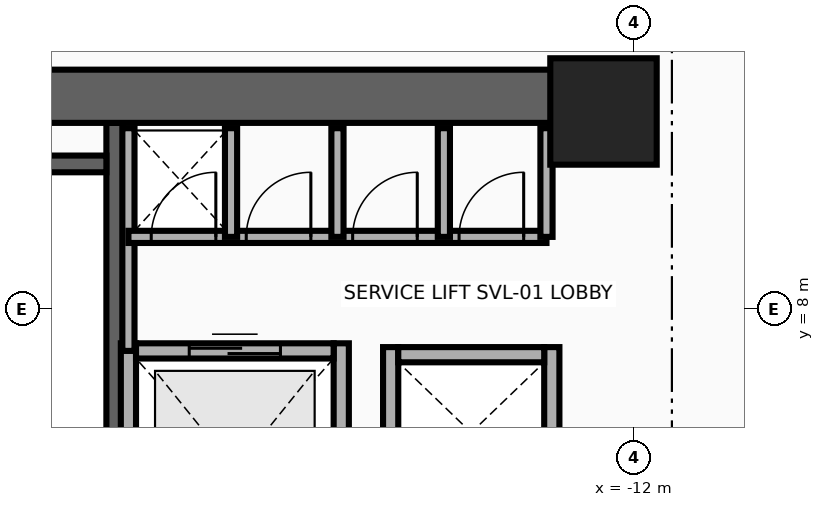
"""IFC4 building model, lengths in metres.
Left out: names, types, materials, properties, quantities, classifications, styles, units other than length and angle.
Written with IfcOpenShell. Run it as: python <this file> out.ifc"""

import sys

from ifc_helpers import new_model, si_unit, direction, frame, frame_2d, origin, origin_2d, place, context, subcontext, project, spatial, rectangle, extrude, source, transform, mapped, element, fill, save


model = new_model("IFC4")
c1 = context("Model", 3, precision=1e-05, world=origin(), true_north=direction((0.0, 1.0)))
c2 = subcontext(c1, "Body", "Model", "MODEL_VIEW")
j1 = project(units=[si_unit("LENGTHUNIT", "METRE"), si_unit("PLANEANGLEUNIT", "RADIAN")], contexts=[c1])
p1 = place(None, origin())
s1 = spatial("IfcSite", under=j1, at=p1, CompositionType="ELEMENT")
p2 = place(p1, origin())
s2 = spatial("IfcBuilding", under=s1, at=p2, CompositionType="ELEMENT")
p3 = place(p2, frame((0.0, 0.0, 48.2)))
s3 = spatial("IfcBuildingStorey", under=s2, at=p3, CompositionType="ELEMENT", Elevation=48.2)
p4 = place(p3, frame((-18.83, 1.78, 0.0), z_axis=(0.0, 0.0, 1.0), x_axis=(0.0, 1.0, 0.0)))
e1 = element("IfcWall", 1, at=p4, inside=s3, PredefinedType="SHEAR", context=c2, shape_type="SweptSolid", body=[
    extrude(rectangle(XDim=8.67, YDim=0.22, at=frame_2d((4.335, 0.0))), origin(), (0.0, 0.0, 1.0), 3.46),
])
p5 = place(p3, frame((-22.05, 9.91, 0.0), z_axis=(0.0, 0.0, 1.0), x_axis=(1.0, 0.0, 0.0)))
e2 = element("IfcWall", 2, at=p5, inside=s3, PredefinedType="SHEAR", context=c2, shape_type="SweptSolid", body=[
    extrude(rectangle(XDim=3.11, YDim=0.22, at=frame_2d((1.555, 0.0))), origin(), (0.0, 0.0, 1.0), 3.46),
])
p6 = place(p3, frame((-22.65, 10.8, 0.0), z_axis=(0.0, 0.0, 1.0), x_axis=(1.0, 0.0, 0.0)))
e3 = element("IfcWall", 3, at=p6, inside=s3, PredefinedType="SHEAR", context=c2, shape_type="SweptSolid", body=[
    extrude(rectangle(XDim=10.25, YDim=0.7, at=frame_2d((5.125, 0.0))), origin(), (0.0, 0.0, 1.0), 3.46),
])
m1 = source(origin(), c2, "Body", "SweptSolid", [
    extrude(rectangle(XDim=1.4, YDim=1.4, at=origin_2d()), origin(), (0.0, 0.0, 1.0), 3.7),
])
p7 = place(p3, frame((-12.4, 10.6, 0.0), z_axis=(0.0, 0.0, 1.0), x_axis=(1.0, 0.0, 0.0)))
e4 = element("IfcColumn", 4, at=p7, inside=s3, PredefinedType="COLUMN", context=c2, shape_type="MappedRepresentation", body=[
    mapped(m1, transform((0.0, 0.0, 0.0), x_axis=(1.0, 0.0, 0.0), y_axis=(0.0, 1.0, 0.0), z_axis=(0.0, 0.0, 1.0), scale=1.0)),
])
for number, where, z_axis, x_axis in (
    (5, (-18.65, 4.225, 0.0), (0.0, 0.0, 1.0), (0.0, 1.0, 0.0)),
    (6, (-15.85, 4.225, 0.0), (0.0, 0.0, 1.0), (0.0, 1.0, 0.0)),
):
    element("IfcWall", number, at=place(p3, frame(where, z_axis=z_axis, x_axis=x_axis)), inside=s3, PredefinedType="MOVABLE", context=c2, shape_type="SweptSolid", body=[
        extrude(rectangle(XDim=3.325, YDim=0.2, at=frame_2d((1.663, 0.0))), origin(), (0.0, 0.0, 1.0), 3.46),
    ])
p8 = place(p3, frame((-18.55, 7.45, 0.0), z_axis=(0.0, 0.0, 1.0), x_axis=(1.0, 0.0, 0.0)))
e7 = element("IfcWall", 7, at=p8, inside=s3, PredefinedType="MOVABLE", context=c2, shape_type="SweptSolid", body=[
    extrude(rectangle(XDim=2.6, YDim=0.2, at=frame_2d((1.3, 0.0))), origin(), (0.0, 0.0, 1.0), 3.46),
])
p9 = place(p8, frame((0.7, 0.0, 0.0)))
e8 = element("IfcOpeningElement", 8, at=p9, cuts=e7, PredefinedType="OPENING", context=c2, shape_type="SweptSolid", body=[
    extrude(rectangle(XDim=1.2, YDim=2.1, at=frame_2d((0.6, 1.05))), frame((0.0, 0.115, 0.0), z_axis=(0.0, -1.0, 0.0), x_axis=(1.0, 0.0, 0.0)), (0.0, 0.0, 1.0), 0.23),
])
for number, where, z_axis, x_axis in (
    (9, (-15.2, 5.25, 0.0), (0.0, 0.0, 1.0), (0.0, 1.0, 0.0)),
    (10, (-13.08, 5.25, 0.0), (0.0, 0.0, 1.0), (0.0, 1.0, 0.0)),
):
    element("IfcWall", number, at=place(p3, frame(where, z_axis=z_axis, x_axis=x_axis)), inside=s3, PredefinedType="MOVABLE", context=c2, shape_type="SweptSolid", body=[
        extrude(rectangle(XDim=2.25, YDim=0.2, at=frame_2d((1.125, 0.0))), origin(), (0.0, 0.0, 1.0), 3.46),
    ])
p10 = place(p3, frame((-15.1, 7.4, 0.0), z_axis=(0.0, 0.0, 1.0), x_axis=(1.0, 0.0, 0.0)))
e11 = element("IfcWall", 11, at=p10, inside=s3, PredefinedType="MOVABLE", context=c2, shape_type="SweptSolid", body=[
    extrude(rectangle(XDim=1.92, YDim=0.2, at=frame_2d((0.96, 0.0))), origin(), (0.0, 0.0, 1.0), 3.46),
])
p11 = place(p3, frame((-18.65, 7.45, 0.0), z_axis=(0.0, 0.0, 1.0), x_axis=(0.0, 1.0, 0.0)))
e12 = element("IfcWall", 12, at=p11, inside=s3, PredefinedType="PARTITIONING", context=c2, shape_type="SweptSolid", body=[
    extrude(rectangle(XDim=2.93, YDim=0.16, at=frame_2d((1.465, 0.0))), origin(), (0.0, 0.0, 1.0), 3.46),
])
p12 = place(p3, frame((-18.65, 8.95, 0.0), z_axis=(0.0, 0.0, 1.0), x_axis=(1.0, 0.0, 0.0)))
e13 = element("IfcWall", 13, at=p12, inside=s3, PredefinedType="PARTITIONING", context=c2, shape_type="SweptSolid", body=[
    extrude(rectangle(XDim=5.5, YDim=0.16, at=frame_2d((2.75, 0.0))), origin(), (0.0, 0.0, 1.0), 3.46),
])
p13 = place(p12, frame((0.3, 0.0, 0.0)))
e14 = element("IfcOpeningElement", 14, at=p13, cuts=e13, PredefinedType="OPENING", context=c2, shape_type="SweptSolid", body=[
    extrude(rectangle(XDim=0.85, YDim=2.05, at=frame_2d((0.425, 1.025))), frame((0.0, 0.095, 0.0), z_axis=(0.0, -1.0, 0.0), x_axis=(1.0, 0.0, 0.0)), (0.0, 0.0, 1.0), 0.19),
])
p14 = place(p12, frame((1.55, 0.0, 0.0)))
e15 = element("IfcOpeningElement", 15, at=p14, cuts=e13, PredefinedType="OPENING", context=c2, shape_type="SweptSolid", body=[
    extrude(rectangle(XDim=0.85, YDim=2.05, at=frame_2d((0.425, 1.025))), frame((0.0, 0.095, 0.0), z_axis=(0.0, -1.0, 0.0), x_axis=(1.0, 0.0, 0.0)), (0.0, 0.0, 1.0), 0.19),
])
p15 = place(p12, frame((2.95, 0.0, 0.0)))
e16 = element("IfcOpeningElement", 16, at=p15, cuts=e13, PredefinedType="OPENING", context=c2, shape_type="SweptSolid", body=[
    extrude(rectangle(XDim=0.85, YDim=2.05, at=frame_2d((0.425, 1.025))), frame((0.0, 0.095, 0.0), z_axis=(0.0, -1.0, 0.0), x_axis=(1.0, 0.0, 0.0)), (0.0, 0.0, 1.0), 0.19),
])
p16 = place(p12, frame((4.35, 0.0, 0.0)))
e17 = element("IfcOpeningElement", 17, at=p16, cuts=e13, PredefinedType="OPENING", context=c2, shape_type="SweptSolid", body=[
    extrude(rectangle(XDim=0.85, YDim=2.05, at=frame_2d((0.425, 1.025))), frame((0.0, 0.095, 0.0), z_axis=(0.0, -1.0, 0.0), x_axis=(1.0, 0.0, 0.0)), (0.0, 0.0, 1.0), 0.19),
])
for number, where, z_axis, x_axis in (
    (18, (-13.15, 8.95, 0.0), (0.0, 0.0, 1.0), (0.0, 1.0, 0.0)),
    (19, (-17.3, 8.95, 0.0), (0.0, 0.0, 1.0), (0.0, 1.0, 0.0)),
    (20, (-15.9, 8.95, 0.0), (0.0, 0.0, 1.0), (0.0, 1.0, 0.0)),
    (21, (-14.5, 8.95, 0.0), (0.0, 0.0, 1.0), (0.0, 1.0, 0.0)),
):
    element("IfcWall", number, at=place(p3, frame(where, z_axis=z_axis, x_axis=x_axis)), inside=s3, PredefinedType="PARTITIONING", context=c2, shape_type="SweptSolid", body=[
        extrude(rectangle(XDim=1.43, YDim=0.16, at=frame_2d((0.715, 0.0))), origin(), (0.0, 0.0, 1.0), 3.46),
    ])
p17 = place(p9, origin())
e22 = element("IfcDoor", 22, at=p17, inside=s3, OperationType="DOUBLE_DOOR_SLIDING", PredefinedType="DOOR", context=c2, shape_type="SweptSolid", body=[
    extrude(rectangle(XDim=1.2, YDim=2.1, at=frame_2d((0.6, 1.05))), frame((0.0, 0.025, 0.0), z_axis=(0.0, -1.0, 0.0), x_axis=(1.0, 0.0, 0.0)), (0.0, 0.0, 1.0), 0.05),
])
fill(e8, e22)
p18 = place(p13, origin())
e23 = element("IfcDoor", 23, at=p18, inside=s3, OperationType="SINGLE_SWING_LEFT", PredefinedType="DOOR", context=c2, shape_type="SweptSolid", body=[
    extrude(rectangle(XDim=0.85, YDim=2.05, at=frame_2d((0.425, 1.025))), frame((0.0, 0.025, 0.0), z_axis=(0.0, -1.0, 0.0), x_axis=(1.0, 0.0, 0.0)), (0.0, 0.0, 1.0), 0.05),
])
fill(e14, e23)
p19 = place(p14, origin())
e24 = element("IfcDoor", 24, at=p19, inside=s3, OperationType="SINGLE_SWING_RIGHT", PredefinedType="DOOR", context=c2, shape_type="SweptSolid", body=[
    extrude(rectangle(XDim=0.85, YDim=2.05, at=frame_2d((0.425, 1.025))), frame((0.0, 0.025, 0.0), z_axis=(0.0, -1.0, 0.0), x_axis=(1.0, 0.0, 0.0)), (0.0, 0.0, 1.0), 0.05),
])
fill(e15, e24)
p20 = place(p15, origin())
e25 = element("IfcDoor", 25, at=p20, inside=s3, OperationType="SINGLE_SWING_LEFT", PredefinedType="DOOR", context=c2, shape_type="SweptSolid", body=[
    extrude(rectangle(XDim=0.85, YDim=2.05, at=frame_2d((0.425, 1.025))), frame((0.0, 0.025, 0.0), z_axis=(0.0, -1.0, 0.0), x_axis=(1.0, 0.0, 0.0)), (0.0, 0.0, 1.0), 0.05),
])
fill(e16, e25)
p21 = place(p16, origin())
e26 = element("IfcDoor", 26, at=p21, inside=s3, OperationType="SINGLE_SWING_RIGHT", PredefinedType="DOOR", context=c2, shape_type="SweptSolid", body=[
    extrude(rectangle(XDim=0.85, YDim=2.05, at=frame_2d((0.425, 1.025))), frame((0.0, 0.025, 0.0), z_axis=(0.0, -1.0, 0.0), x_axis=(1.0, 0.0, 0.0)), (0.0, 0.0, 1.0), 0.05),
])
fill(e17, e26)
save(model, sys.argv[1])
